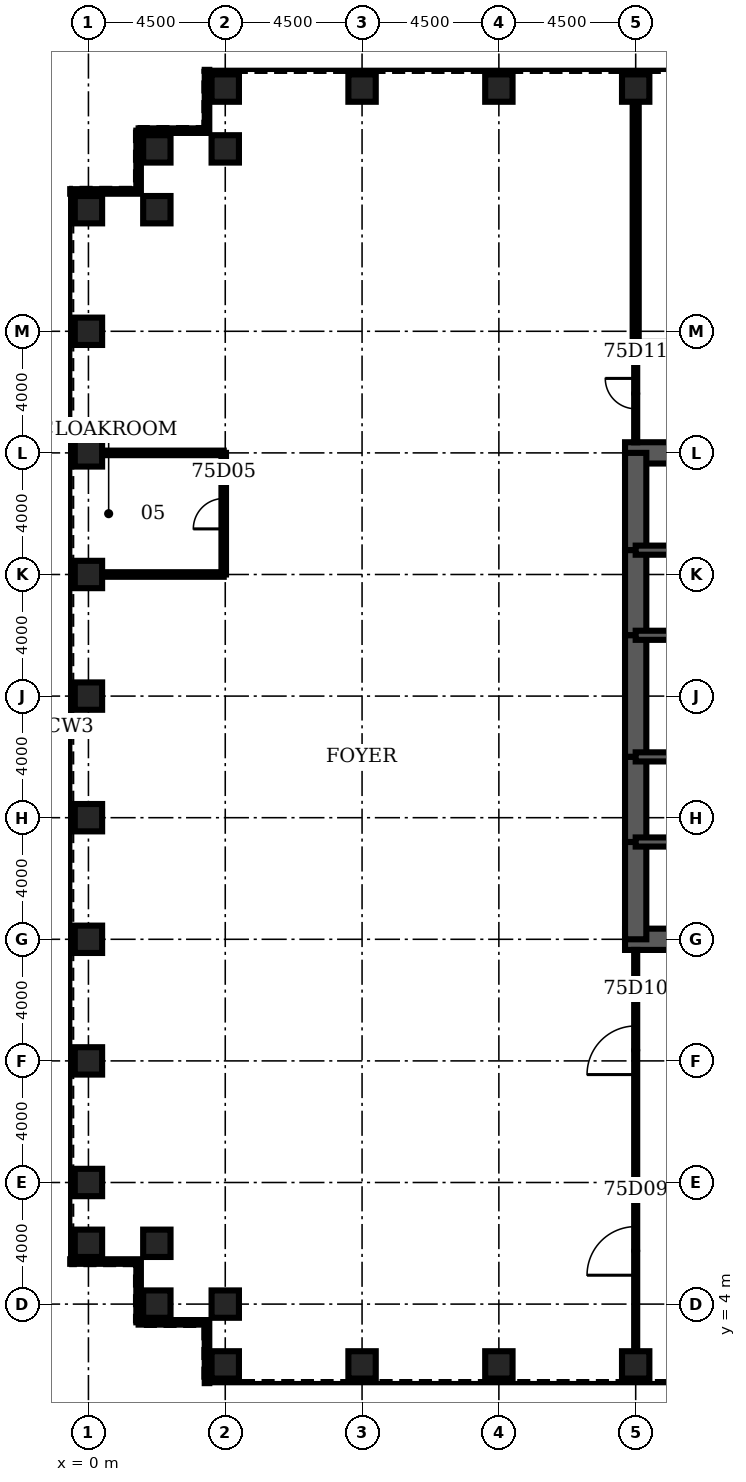
"""IFC4 building model, lengths in metres.
Left out: names, types, materials, properties, quantities, classifications, styles, units other than length and angle.
Written with IfcOpenShell. Run it as: python <this file> out.ifc"""

import sys

from ifc_helpers import new_model, si_unit, direction, frame, frame_2d, origin, origin_2d, place, context, subcontext, project, spatial, rectangle, hollow_rectangle, extrude, element, fill, save


model = new_model("IFC4")
c1 = context("Model", 3, precision=1e-05, world=origin(), true_north=direction((0.0, 1.0)))
c2 = subcontext(c1, "Body", "Model", "MODEL_VIEW")
j1 = project(units=[si_unit("LENGTHUNIT", "METRE"), si_unit("PLANEANGLEUNIT", "RADIAN")], contexts=[c1])
p1 = place(None, origin())
s1 = spatial("IfcSite", under=j1, at=p1, CompositionType="ELEMENT")
p2 = place(p1, origin())
s2 = spatial("IfcBuilding", under=s1, at=p2, CompositionType="ELEMENT")
p3 = place(p2, frame((0.0, 0.0, 329.9)))
s3 = spatial("IfcBuildingStorey", under=s2, at=p3, CompositionType="ELEMENT", Elevation=329.9)
for number, where, z_axis, x_axis in (
    (1, (4.5, 2.0, 0.0), (0.0, 0.0, 1.0), (0.0, 1.0, 0.0)),
    (2, (9.0, 2.0, 0.0), (0.0, 0.0, 1.0), (0.0, 1.0, 0.0)),
    (3, (13.5, 2.0, 0.0), (0.0, 0.0, 1.0), (0.0, 1.0, 0.0)),
    (4, (18.0, 2.0, 0.0), (0.0, 0.0, 1.0), (0.0, 1.0, 0.0)),
    (5, (18.0, 44.0, 0.0), (0.0, 0.0, 1.0), (0.0, 1.0, 0.0)),
    (6, (13.5, 44.0, 0.0), (0.0, 0.0, 1.0), (0.0, 1.0, 0.0)),
    (7, (9.0, 44.0, 0.0), (0.0, 0.0, 1.0), (0.0, 1.0, 0.0)),
    (8, (4.5, 44.0, 0.0), (0.0, 0.0, 1.0), (0.0, 1.0, 0.0)),
    (9, (4.5, 42.0, 0.0), (0.0, 0.0, 1.0), (0.0, 1.0, 0.0)),
    (10, (2.25, 42.0, 0.0), (0.0, 0.0, 1.0), (1.0, 0.0, 0.0)),
    (11, (2.25, 40.0, 0.0), (0.0, 0.0, 1.0), (1.0, 0.0, 0.0)),
    (12, (0.0, 40.0, 0.0), (0.0, 0.0, 1.0), (1.0, 0.0, 0.0)),
    (13, (0.0, 36.0, 0.0), (0.0, 0.0, 1.0), (1.0, 0.0, 0.0)),
    (14, (0.0, 32.0, 0.0), (0.0, 0.0, 1.0), (1.0, 0.0, 0.0)),
    (15, (0.0, 28.0, 0.0), (0.0, 0.0, 1.0), (1.0, 0.0, 0.0)),
    (16, (0.0, 24.0, 0.0), (0.0, 0.0, 1.0), (1.0, 0.0, 0.0)),
    (17, (0.0, 20.0, 0.0), (0.0, 0.0, 1.0), (1.0, 0.0, 0.0)),
    (18, (0.0, 16.0, 0.0), (0.0, 0.0, 1.0), (1.0, 0.0, 0.0)),
    (19, (0.0, 12.0, 0.0), (0.0, 0.0, 1.0), (1.0, 0.0, 0.0)),
    (20, (0.0, 8.0, 0.0), (0.0, 0.0, 1.0), (1.0, 0.0, 0.0)),
    (21, (0.0, 6.0, 0.0), (0.0, 0.0, 1.0), (1.0, 0.0, 0.0)),
    (22, (2.25, 6.0, 0.0), (0.0, 0.0, 1.0), (1.0, 0.0, 0.0)),
    (23, (2.25, 4.0, 0.0), (0.0, 0.0, 1.0), (1.0, 0.0, 0.0)),
    (24, (4.5, 4.0, 0.0), (0.0, 0.0, 1.0), (0.0, 1.0, 0.0)),
):
    element("IfcColumn", number, at=place(p3, frame(where, z_axis=z_axis, x_axis=x_axis)), inside=s3, PredefinedType="COLUMN", context=c2, shape_type="SweptSolid", body=[
        extrude(hollow_rectangle(XDim=0.9, YDim=0.9, WallThickness=0.05, at=origin_2d()), origin(), (0.0, 0.0, 1.0), 4.2),
    ])
for number, where, z_axis, x_axis in (
    (25, (17.65, 16.0, 0.0), (0.0, 0.0, 1.0), (1.0, 0.0, 0.0)),
    (26, (27.0, 32.0, 0.0), (0.0, 0.0, 1.0), (-1.0, 0.0, 0.0)),
):
    element("IfcWall", number, at=place(p3, frame(where, z_axis=z_axis, x_axis=x_axis)), inside=s3, PredefinedType="SHEAR", context=c2, shape_type="SweptSolid", body=[
        extrude(rectangle(XDim=9.35, YDim=0.7, at=frame_2d((4.675, 0.0))), origin(), (0.0, 0.0, 1.0), 4.2),
    ])
p4 = place(p3, frame((18.0, 32.0, 0.0), z_axis=(0.0, 0.0, 1.0), x_axis=(0.0, -1.0, 0.0)))
e27 = element("IfcWall", 27, at=p4, inside=s3, PredefinedType="SHEAR", context=c2, shape_type="SweptSolid", body=[
    extrude(rectangle(XDim=3.2, YDim=0.7, at=frame_2d((1.6, 0.0))), origin(), (0.0, 0.0, 1.0), 4.2),
])
p5 = place(p3, frame((18.0, 28.8, 0.0), z_axis=(0.0, 0.0, 1.0), x_axis=(0.0, -1.0, 0.0)))
e28 = element("IfcWall", 28, at=p5, inside=s3, PredefinedType="SHEAR", context=c2, shape_type="SweptSolid", body=[
    extrude(rectangle(XDim=2.8, YDim=0.7, at=frame_2d((1.4, 0.0))), origin(), (0.0, 0.0, 1.0), 4.2),
])
p6 = place(p5, frame((0.4, 0.0, 0.0)))
e29 = element("IfcOpeningElement", 29, at=p6, cuts=e28, PredefinedType="OPENING", context=c2, shape_type="SweptSolid", body=[
    extrude(rectangle(XDim=1.8, YDim=2.1, at=frame_2d((0.9, 1.05))), frame((0.0, 0.36, 0.0), z_axis=(0.0, -1.0, 0.0), x_axis=(1.0, 0.0, 0.0)), (0.0, 0.0, 1.0), 0.72),
])
p7 = place(p3, frame((18.0, 26.0, 0.0), z_axis=(0.0, 0.0, 1.0), x_axis=(0.0, -1.0, 0.0)))
e30 = element("IfcWall", 30, at=p7, inside=s3, PredefinedType="SHEAR", context=c2, shape_type="SweptSolid", body=[
    extrude(rectangle(XDim=4.0, YDim=0.7, at=frame_2d((2.0, 0.0))), origin(), (0.0, 0.0, 1.0), 4.2),
])
p8 = place(p3, frame((18.0, 22.0, 0.0), z_axis=(0.0, 0.0, 1.0), x_axis=(0.0, -1.0, 0.0)))
e31 = element("IfcWall", 31, at=p8, inside=s3, PredefinedType="SHEAR", context=c2, shape_type="SweptSolid", body=[
    extrude(rectangle(XDim=2.8, YDim=0.7, at=frame_2d((1.4, 0.0))), origin(), (0.0, 0.0, 1.0), 4.2),
])
p9 = place(p8, frame((0.6, 0.0, 0.0)))
e32 = element("IfcOpeningElement", 32, at=p9, cuts=e31, PredefinedType="OPENING", context=c2, shape_type="SweptSolid", body=[
    extrude(rectangle(XDim=1.8, YDim=2.1, at=frame_2d((0.9, 1.05))), frame((0.0, 0.36, 0.0), z_axis=(0.0, -1.0, 0.0), x_axis=(1.0, 0.0, 0.0)), (0.0, 0.0, 1.0), 0.72),
])
p10 = place(p3, frame((18.0, 19.2, 0.0), z_axis=(0.0, 0.0, 1.0), x_axis=(0.0, -1.0, 0.0)))
e33 = element("IfcWall", 33, at=p10, inside=s3, PredefinedType="SHEAR", context=c2, shape_type="SweptSolid", body=[
    extrude(rectangle(XDim=3.2, YDim=0.7, at=frame_2d((1.6, 0.0))), origin(), (0.0, 0.0, 1.0), 4.2),
])
p11 = place(p3, frame((18.0, 19.2, 0.0), z_axis=(0.0, 0.0, 1.0), x_axis=(1.0, 0.0, 0.0)))
e34 = element("IfcWall", 34, at=p11, inside=s3, PredefinedType="SOLIDWALL", context=c2, shape_type="SweptSolid", body=[
    extrude(rectangle(XDim=9.0, YDim=0.3, at=frame_2d((4.5, 0.0))), origin(), (0.0, 0.0, 1.0), 4.2),
])
p12 = place(p11, frame((0.65, 0.0, 0.0)))
e35 = element("IfcOpeningElement", 35, at=p12, cuts=e34, PredefinedType="OPENING", context=c2, shape_type="SweptSolid", body=[
    extrude(rectangle(XDim=1.0, YDim=2.1, at=frame_2d((0.5, 1.05))), frame((0.0, 0.16, 0.0), z_axis=(0.0, -1.0, 0.0), x_axis=(1.0, 0.0, 0.0)), (0.0, 0.0, 1.0), 0.32),
])
p13 = place(p3, frame((18.0, 28.8, 0.0), z_axis=(0.0, 0.0, 1.0), x_axis=(1.0, 0.0, 0.0)))
e36 = element("IfcWall", 36, at=p13, inside=s3, PredefinedType="SOLIDWALL", context=c2, shape_type="SweptSolid", body=[
    extrude(rectangle(XDim=9.0, YDim=0.3, at=frame_2d((4.5, 0.0))), origin(), (0.0, 0.0, 1.0), 4.2),
])
p14 = place(p13, frame((0.65, 0.0, 0.0)))
e37 = element("IfcOpeningElement", 37, at=p14, cuts=e36, PredefinedType="OPENING", context=c2, shape_type="SweptSolid", body=[
    extrude(rectangle(XDim=1.0, YDim=2.1, at=frame_2d((0.5, 1.05))), frame((0.0, 0.16, 0.0), z_axis=(0.0, -1.0, 0.0), x_axis=(1.0, 0.0, 0.0)), (0.0, 0.0, 1.0), 0.32),
])
p15 = place(p3, frame((18.0, 22.0, 0.0), z_axis=(0.0, 0.0, 1.0), x_axis=(1.0, 0.0, 0.0)))
e38 = element("IfcWall", 38, at=p15, inside=s3, PredefinedType="SOLIDWALL", context=c2, shape_type="SweptSolid", body=[
    extrude(rectangle(XDim=6.0, YDim=0.3, at=frame_2d((3.0, 0.0))), origin(), (0.0, 0.0, 1.0), 4.2),
])
p16 = place(p15, frame((4.4, 0.0, 0.0)))
e39 = element("IfcOpeningElement", 39, at=p16, cuts=e38, PredefinedType="OPENING", context=c2, shape_type="SweptSolid", body=[
    extrude(rectangle(XDim=1.0, YDim=2.1, at=frame_2d((0.5, 1.05))), frame((0.0, 0.16, 0.0), z_axis=(0.0, -1.0, 0.0), x_axis=(1.0, 0.0, 0.0)), (0.0, 0.0, 1.0), 0.32),
])
p17 = place(p15, frame((0.9, 0.0, 0.0)))
e40 = element("IfcOpeningElement", 40, at=p17, cuts=e38, PredefinedType="OPENING", context=c2, shape_type="SweptSolid", body=[
    extrude(rectangle(XDim=1.0, YDim=2.1, at=frame_2d((0.5, 1.05))), frame((0.0, 0.16, 0.0), z_axis=(0.0, -1.0, 0.0), x_axis=(1.0, 0.0, 0.0)), (0.0, 0.0, 1.0), 0.32),
])
p18 = place(p3, frame((18.0, 26.0, 0.0), z_axis=(0.0, 0.0, 1.0), x_axis=(1.0, 0.0, 0.0)))
e41 = element("IfcWall", 41, at=p18, inside=s3, PredefinedType="SOLIDWALL", context=c2, shape_type="SweptSolid", body=[
    extrude(rectangle(XDim=6.0, YDim=0.3, at=frame_2d((3.0, 0.0))), origin(), (0.0, 0.0, 1.0), 4.2),
])
p19 = place(p3, frame((0.45, 28.0, 0.0), z_axis=(0.0, 0.0, 1.0), x_axis=(1.0, 0.0, 0.0)))
e42 = element("IfcWall", 42, at=p19, inside=s3, PredefinedType="PARTITIONING", context=c2, shape_type="SweptSolid", body=[
    extrude(rectangle(XDim=4.0, YDim=0.15, at=frame_2d((2.0, 0.0))), origin(), (0.0, 0.0, 1.0), 3.0),
])
p20 = place(p3, frame((0.45, 32.0, 0.0), z_axis=(0.0, 0.0, 1.0), x_axis=(1.0, 0.0, 0.0)))
e43 = element("IfcWall", 43, at=p20, inside=s3, PredefinedType="PARTITIONING", context=c2, shape_type="SweptSolid", body=[
    extrude(rectangle(XDim=4.0, YDim=0.15, at=frame_2d((2.0, 0.0))), origin(), (0.0, 0.0, 1.0), 2.942),
])
p21 = place(p3, frame((18.0, 35.55, 0.0), z_axis=(0.0, 0.0, 1.0), x_axis=(1.0, 0.0, 0.0)))
e44 = element("IfcWall", 44, at=p21, inside=s3, PredefinedType="PARTITIONING", context=c2, shape_type="SweptSolid", body=[
    extrude(rectangle(XDim=27.0, YDim=0.2, at=frame_2d((13.5, 0.0))), origin(), (0.0, 0.0, 1.0), 3.0),
])
p22 = place(p21, frame((5.95, 0.0, 0.0)))
e45 = element("IfcOpeningElement", 45, at=p22, cuts=e44, PredefinedType="OPENING", context=c2, shape_type="SweptSolid", body=[
    extrude(rectangle(XDim=1.6, YDim=2.1, at=frame_2d((0.8, 1.05))), frame((0.0, 0.11, 0.0), z_axis=(0.0, -1.0, 0.0), x_axis=(1.0, 0.0, 0.0)), (0.0, 0.0, 1.0), 0.22),
])
p23 = place(p21, frame((19.45, 0.0, 0.0)))
e46 = element("IfcOpeningElement", 46, at=p23, cuts=e44, PredefinedType="OPENING", context=c2, shape_type="SweptSolid", body=[
    extrude(rectangle(XDim=1.6, YDim=2.1, at=frame_2d((0.8, 1.05))), frame((0.0, 0.11, 0.0), z_axis=(0.0, -1.0, 0.0), x_axis=(1.0, 0.0, 0.0)), (0.0, 0.0, 1.0), 0.22),
])
p24 = place(p3, frame((4.45, 28.0, 0.0), z_axis=(0.0, 0.0, 1.0), x_axis=(0.0, 1.0, 0.0)))
e47 = element("IfcWall", 47, at=p24, inside=s3, PredefinedType="PARTITIONING", context=c2, shape_type="SweptSolid", body=[
    extrude(rectangle(XDim=4.0, YDim=0.15, at=frame_2d((2.0, 0.0))), origin(), (0.0, 0.0, 1.0), 3.0),
])
p25 = place(p24, frame((1.5, 0.0, 0.0)))
e48 = element("IfcOpeningElement", 48, at=p25, cuts=e47, PredefinedType="OPENING", context=c2, shape_type="SweptSolid", body=[
    extrude(rectangle(XDim=1.0, YDim=2.1, at=frame_2d((0.5, 1.05))), frame((0.0, 0.085, 0.0), z_axis=(0.0, -1.0, 0.0), x_axis=(1.0, 0.0, 0.0)), (0.0, 0.0, 1.0), 0.17),
])
p26 = place(p3, frame((18.0, 2.45, 0.0), z_axis=(0.0, 0.0, 1.0), x_axis=(0.0, 1.0, 0.0)))
e49 = element("IfcWall", 49, at=p26, inside=s3, PredefinedType="PARTITIONING", context=c2, shape_type="SweptSolid", body=[
    extrude(rectangle(XDim=13.2, YDim=0.1, at=frame_2d((6.6, 0.0))), origin(), (0.0, 0.0, 1.0), 3.0),
])
p27 = place(p26, frame((2.5, 0.0, 0.0)))
e50 = element("IfcOpeningElement", 50, at=p27, cuts=e49, PredefinedType="OPENING", context=c2, shape_type="SweptSolid", body=[
    extrude(rectangle(XDim=1.6, YDim=2.1, at=frame_2d((0.8, 1.05))), frame((0.0, 0.06, 0.0), z_axis=(0.0, -1.0, 0.0), x_axis=(1.0, 0.0, 0.0)), (0.0, 0.0, 1.0), 0.12),
])
p28 = place(p26, frame((9.1, 0.0, 0.0)))
e51 = element("IfcOpeningElement", 51, at=p28, cuts=e49, PredefinedType="OPENING", context=c2, shape_type="SweptSolid", body=[
    extrude(rectangle(XDim=1.6, YDim=2.1, at=frame_2d((0.8, 1.05))), frame((0.0, 0.06, 0.0), z_axis=(0.0, -1.0, 0.0), x_axis=(1.0, 0.0, 0.0)), (0.0, 0.0, 1.0), 0.12),
])
p29 = place(p3, frame((18.0, 32.35, 0.0), z_axis=(0.0, 0.0, 1.0), x_axis=(0.0, 1.0, 0.0)))
e52 = element("IfcWall", 52, at=p29, inside=s3, PredefinedType="PARTITIONING", context=c2, shape_type="SweptSolid", body=[
    extrude(rectangle(XDim=3.2, YDim=0.1, at=frame_2d((1.6, 0.0))), origin(), (0.0, 0.0, 1.0), 3.0),
])
p30 = place(p29, frame((1.1, 0.0, 0.0)))
e53 = element("IfcOpeningElement", 53, at=p30, cuts=e52, PredefinedType="OPENING", context=c2, shape_type="SweptSolid", body=[
    extrude(rectangle(XDim=1.0, YDim=2.1, at=frame_2d((0.5, 1.05))), frame((0.0, 0.06, 0.0), z_axis=(0.0, -1.0, 0.0), x_axis=(1.0, 0.0, 0.0)), (0.0, 0.0, 1.0), 0.12),
])
p31 = place(p3, frame((18.0, 35.55, 0.0), z_axis=(0.0, 0.0, 1.0), x_axis=(0.0, 1.0, 0.0)))
e54 = element("IfcWall", 54, at=p31, inside=s3, PredefinedType="PARTITIONING", context=c2, shape_type="SweptSolid", body=[
    extrude(rectangle(XDim=8.0, YDim=0.2, at=frame_2d((4.0, 0.0))), origin(), (0.0, 0.0, 1.0), 3.0),
])
p32 = place(p3, frame((3.9, 44.6, 0.0), z_axis=(0.0, 0.0, 1.0), x_axis=(0.0, -1.0, 0.0)))
e55 = element("IfcWall", 55, at=p32, inside=s3, PredefinedType="ELEMENTEDWALL", context=c2, shape_type="SweptSolid", body=[
    extrude(rectangle(XDim=2.0, YDim=0.15, at=frame_2d((1.0, 0.0))), origin(), (0.0, 0.0, 1.0), 3.95),
])
p33 = place(p3, frame((3.9, 42.6, 0.0), z_axis=(0.0, 0.0, 1.0), x_axis=(-1.0, 0.0, 0.0)))
e56 = element("IfcWall", 56, at=p33, inside=s3, PredefinedType="ELEMENTEDWALL", context=c2, shape_type="SweptSolid", body=[
    extrude(rectangle(XDim=2.25, YDim=0.15, at=frame_2d((1.125, 0.0))), origin(), (0.0, 0.0, 1.0), 3.95),
])
p34 = place(p3, frame((1.65, 42.6, 0.0), z_axis=(0.0, 0.0, 1.0), x_axis=(0.0, -1.0, 0.0)))
e57 = element("IfcWall", 57, at=p34, inside=s3, PredefinedType="ELEMENTEDWALL", context=c2, shape_type="SweptSolid", body=[
    extrude(rectangle(XDim=2.0, YDim=0.15, at=frame_2d((1.0, 0.0))), origin(), (0.0, 0.0, 1.0), 3.95),
])
for number, where, z_axis, x_axis in (
    (58, (1.65, 40.6, 0.0), (0.0, 0.0, 1.0), (-1.0, 0.0, 0.0)),
    (59, (-0.6, 5.4, 0.0), (0.0, 0.0, 1.0), (1.0, 0.0, 0.0)),
):
    element("IfcWall", number, at=place(p3, frame(where, z_axis=z_axis, x_axis=x_axis)), inside=s3, PredefinedType="ELEMENTEDWALL", context=c2, shape_type="SweptSolid", body=[
        extrude(rectangle(XDim=2.25, YDim=0.15, at=frame_2d((1.125, 0.0))), origin(), (0.0, 0.0, 1.0), 3.95),
    ])
p35 = place(p3, frame((1.65, 5.4, 0.0), z_axis=(0.0, 0.0, 1.0), x_axis=(0.0, -1.0, 0.0)))
e60 = element("IfcWall", 60, at=p35, inside=s3, PredefinedType="ELEMENTEDWALL", context=c2, shape_type="SweptSolid", body=[
    extrude(rectangle(XDim=2.0, YDim=0.15, at=frame_2d((1.0, 0.0))), origin(), (0.0, 0.0, 1.0), 3.95),
])
p36 = place(p3, frame((1.65, 3.4, 0.0), z_axis=(0.0, 0.0, 1.0), x_axis=(1.0, 0.0, 0.0)))
e61 = element("IfcWall", 61, at=p36, inside=s3, PredefinedType="ELEMENTEDWALL", context=c2, shape_type="SweptSolid", body=[
    extrude(rectangle(XDim=2.25, YDim=0.15, at=frame_2d((1.125, 0.0))), origin(), (0.0, 0.0, 1.0), 3.95),
])
p37 = place(p3, frame((3.9, 3.4, 0.0), z_axis=(0.0, 0.0, 1.0), x_axis=(0.0, -1.0, 0.0)))
e62 = element("IfcWall", 62, at=p37, inside=s3, PredefinedType="ELEMENTEDWALL", context=c2, shape_type="SweptSolid", body=[
    extrude(rectangle(XDim=2.0, YDim=0.15, at=frame_2d((1.0, 0.0))), origin(), (0.0, 0.0, 1.0), 3.95),
])
p38 = place(p25, origin())
e63 = element("IfcDoor", 63, at=p38, inside=s3, OperationType="SINGLE_SWING_LEFT", PredefinedType="DOOR", context=c2, shape_type="SweptSolid", body=[
    extrude(rectangle(XDim=1.0, YDim=2.1, at=frame_2d((0.5, 1.05))), frame((0.0, 0.025, 0.0), z_axis=(0.0, -1.0, 0.0), x_axis=(1.0, 0.0, 0.0)), (0.0, 0.0, 1.0), 0.05),
])
fill(e48, e63)
p39 = place(p27, origin())
e64 = element("IfcDoor", 64, at=p39, inside=s3, OperationType="SINGLE_SWING_LEFT", PredefinedType="DOOR", context=c2, shape_type="SweptSolid", body=[
    extrude(rectangle(XDim=1.6, YDim=2.1, at=frame_2d((0.8, 1.05))), frame((0.0, 0.025, 0.0), z_axis=(0.0, -1.0, 0.0), x_axis=(1.0, 0.0, 0.0)), (0.0, 0.0, 1.0), 0.05),
])
fill(e50, e64)
p40 = place(p28, origin())
e65 = element("IfcDoor", 65, at=p40, inside=s3, OperationType="SINGLE_SWING_LEFT", PredefinedType="DOOR", context=c2, shape_type="SweptSolid", body=[
    extrude(rectangle(XDim=1.6, YDim=2.1, at=frame_2d((0.8, 1.05))), frame((0.0, 0.025, 0.0), z_axis=(0.0, -1.0, 0.0), x_axis=(1.0, 0.0, 0.0)), (0.0, 0.0, 1.0), 0.05),
])
fill(e51, e65)
p41 = place(p30, origin())
e66 = element("IfcDoor", 66, at=p41, inside=s3, OperationType="SINGLE_SWING_RIGHT", PredefinedType="DOOR", context=c2, shape_type="SweptSolid", body=[
    extrude(rectangle(XDim=1.0, YDim=2.1, at=frame_2d((0.5, 1.05))), frame((0.0, 0.025, 0.0), z_axis=(0.0, -1.0, 0.0), x_axis=(1.0, 0.0, 0.0)), (0.0, 0.0, 1.0), 0.05),
])
fill(e53, e66)
p42 = place(p12, origin())
e67 = element("IfcDoor", 67, at=p42, inside=s3, OperationType="SINGLE_SWING_LEFT", PredefinedType="DOOR", context=c2, shape_type="SweptSolid", body=[
    extrude(rectangle(XDim=1.0, YDim=2.1, at=frame_2d((0.5, 1.05))), frame((0.0, 0.025, 0.0), z_axis=(0.0, -1.0, 0.0), x_axis=(1.0, 0.0, 0.0)), (0.0, 0.0, 1.0), 0.05),
])
fill(e35, e67)
p43 = place(p14, origin())
e68 = element("IfcDoor", 68, at=p43, inside=s3, OperationType="SINGLE_SWING_LEFT", PredefinedType="DOOR", context=c2, shape_type="SweptSolid", body=[
    extrude(rectangle(XDim=1.0, YDim=2.1, at=frame_2d((0.5, 1.05))), frame((0.0, 0.025, 0.0), z_axis=(0.0, -1.0, 0.0), x_axis=(1.0, 0.0, 0.0)), (0.0, 0.0, 1.0), 0.05),
])
fill(e37, e68)
p44 = place(p9, origin())
e69 = element("IfcDoor", 69, at=p44, inside=s3, OperationType="SINGLE_SWING_LEFT", PredefinedType="DOOR", context=c2, shape_type="SweptSolid", body=[
    extrude(rectangle(XDim=1.8, YDim=2.1, at=frame_2d((0.9, 1.05))), frame((0.0, 0.35, 0.0), z_axis=(0.0, -1.0, 0.0), x_axis=(1.0, 0.0, 0.0)), (0.0, 0.0, 1.0), 0.699),
])
fill(e32, e69)
p45 = place(p6, origin())
e70 = element("IfcDoor", 70, at=p45, inside=s3, OperationType="SINGLE_SWING_LEFT", PredefinedType="DOOR", context=c2, shape_type="SweptSolid", body=[
    extrude(rectangle(XDim=1.8, YDim=2.1, at=frame_2d((0.9, 1.05))), frame((0.0, 0.35, 0.0), z_axis=(0.0, -1.0, 0.0), x_axis=(1.0, 0.0, 0.0)), (0.0, 0.0, 1.0), 0.699),
])
fill(e29, e70)
p46 = place(p17, origin())
e71 = element("IfcDoor", 71, at=p46, inside=s3, OperationType="SINGLE_SWING_LEFT", PredefinedType="DOOR", context=c2, shape_type="SweptSolid", body=[
    extrude(rectangle(XDim=1.0, YDim=2.1, at=frame_2d((0.5, 1.05))), frame((0.0, 0.025, 0.0), z_axis=(0.0, -1.0, 0.0), x_axis=(1.0, 0.0, 0.0)), (0.0, 0.0, 1.0), 0.05),
])
fill(e40, e71)
save(model, sys.argv[1])
